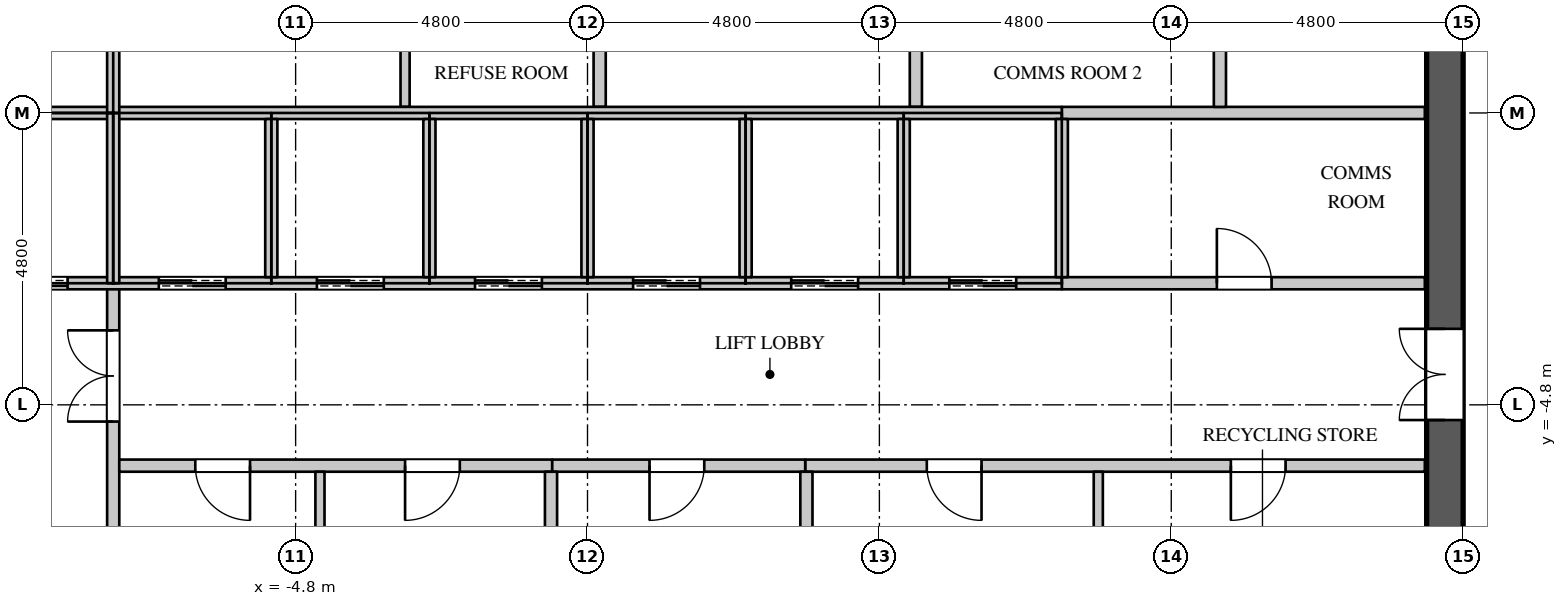
"""IFC4 building model, lengths in metres.
Left out: names, types, materials, properties, quantities, classifications, styles, units other than length and angle.
Written with IfcOpenShell. Run it as: python <this file> out.ifc"""

import sys

from ifc_helpers import new_model, si_unit, direction, frame, frame_2d, origin, place, context, subcontext, project, spatial, rectangle, extrude, element, fill, save


model = new_model("IFC4")
c1 = context("Model", 3, precision=1e-05, world=origin(), true_north=direction((0.0, 1.0)))
c2 = subcontext(c1, "Body", "Model", "MODEL_VIEW")
j1 = project(units=[si_unit("LENGTHUNIT", "METRE"), si_unit("PLANEANGLEUNIT", "RADIAN")], contexts=[c1])
p1 = place(None, origin())
s1 = spatial("IfcSite", under=j1, at=p1, CompositionType="ELEMENT")
p2 = place(p1, origin())
s2 = spatial("IfcBuilding", under=s1, at=p2, CompositionType="ELEMENT")
p3 = place(p2, frame((0.0, 0.0, 260.1)))
s3 = spatial("IfcBuildingStorey", under=s2, at=p3, CompositionType="ELEMENT", Elevation=260.1)
p4 = place(p3, frame((14.1, -11.4, 0.0), z_axis=(0.0, 0.0, 1.0), x_axis=(0.0, 1.0, 0.0)))
e1 = element("IfcWall", 1, at=p4, inside=s3, PredefinedType="SHEAR", context=c2, shape_type="SweptSolid", body=[
    extrude(rectangle(XDim=22.8, YDim=0.6, at=frame_2d((11.4, 0.0))), origin(), (0.0, 0.0, 1.0), 4.2),
])
p5 = place(p4, frame((20.45, 0.0, 0.0)))
e2 = element("IfcOpeningElement", 2, at=p5, cuts=e1, PredefinedType="OPENING", context=c2, shape_type="SweptSolid", body=[
    extrude(rectangle(XDim=1.1, YDim=2.2, at=frame_2d((0.55, 1.1))), frame((0.0, 0.31, 0.0), z_axis=(0.0, -1.0, 0.0), x_axis=(1.0, 0.0, 0.0)), (0.0, 0.0, 1.0), 0.62),
])
p6 = place(p4, frame((1.25, 0.0, 0.0)))
e3 = element("IfcOpeningElement", 3, at=p6, cuts=e1, PredefinedType="OPENING", context=c2, shape_type="SweptSolid", body=[
    extrude(rectangle(XDim=1.1, YDim=2.2, at=frame_2d((0.55, 1.1))), frame((0.0, 0.31, 0.0), z_axis=(0.0, -1.0, 0.0), x_axis=(1.0, 0.0, 0.0)), (0.0, 0.0, 1.0), 0.62),
])
p7 = place(p4, frame((14.95, 0.0, 0.0)))
e4 = element("IfcOpeningElement", 4, at=p7, cuts=e1, PredefinedType="OPENING", context=c2, shape_type="SweptSolid", body=[
    extrude(rectangle(XDim=1.5, YDim=2.4, at=frame_2d((0.75, 1.2))), frame((0.0, 0.31, 0.0), z_axis=(0.0, -1.0, 0.0), x_axis=(1.0, 0.0, 0.0)), (0.0, 0.0, 1.0), 0.62),
])
p8 = place(p4, frame((6.35, 0.0, 0.0)))
e5 = element("IfcOpeningElement", 5, at=p8, cuts=e1, PredefinedType="OPENING", context=c2, shape_type="SweptSolid", body=[
    extrude(rectangle(XDim=1.5, YDim=2.4, at=frame_2d((0.75, 1.2))), frame((0.0, 0.31, 0.0), z_axis=(0.0, -1.0, 0.0), x_axis=(1.0, 0.0, 0.0)), (0.0, 0.0, 1.0), 0.62),
])
p9 = place(p3, frame((-7.8, -8.075, 0.0), z_axis=(0.0, 0.0, 1.0), x_axis=(0.0, 1.0, 0.0)))
e6 = element("IfcWall", 6, at=p9, inside=s3, PredefinedType="PARTITIONING", context=c2, shape_type="SweptSolid", body=[
    extrude(rectangle(XDim=5.275, YDim=0.2, at=frame_2d((2.637, 0.0))), origin(), (0.0, 0.0, 1.0), 3.95),
])
p10 = place(p9, frame((3.0, 0.0, 0.0)))
e7 = element("IfcOpeningElement", 7, at=p10, cuts=e6, PredefinedType="OPENING", context=c2, shape_type="SweptSolid", body=[
    extrude(rectangle(XDim=1.5, YDim=2.4, at=frame_2d((0.75, 1.2))), frame((0.0, 0.11, 0.0), z_axis=(0.0, -1.0, 0.0), x_axis=(1.0, 0.0, 0.0)), (0.0, 0.0, 1.0), 0.22),
])
p11 = place(p3, frame((-7.7, -5.8, 0.0), z_axis=(0.0, 0.0, 1.0), x_axis=(1.0, 0.0, 0.0)))
e8 = element("IfcWall", 8, at=p11, inside=s3, PredefinedType="PARTITIONING", context=c2, shape_type="SweptSolid", body=[
    extrude(rectangle(XDim=7.12, YDim=0.2, at=frame_2d((3.56, 0.0))), origin(), (0.0, 0.0, 1.0), 3.95),
])
p12 = place(p11, frame((1.25, 0.0, 0.0)))
e9 = element("IfcOpeningElement", 9, at=p12, cuts=e8, PredefinedType="OPENING", context=c2, shape_type="SweptSolid", body=[
    extrude(rectangle(XDim=0.9, YDim=2.2, at=frame_2d((0.45, 1.1))), frame((0.0, 0.11, 0.0), z_axis=(0.0, -1.0, 0.0), x_axis=(1.0, 0.0, 0.0)), (0.0, 0.0, 1.0), 0.22),
])
p13 = place(p11, frame((4.7, 0.0, 0.0)))
e10 = element("IfcOpeningElement", 10, at=p13, cuts=e8, PredefinedType="OPENING", context=c2, shape_type="SweptSolid", body=[
    extrude(rectangle(XDim=0.9, YDim=2.2, at=frame_2d((0.45, 1.1))), frame((0.0, 0.11, 0.0), z_axis=(0.0, -1.0, 0.0), x_axis=(1.0, 0.0, 0.0)), (0.0, 0.0, 1.0), 0.22),
])
p14 = place(p3, frame((3.58, -5.8, 0.0), z_axis=(0.0, 0.0, 1.0), x_axis=(1.0, 0.0, 0.0)))
e11 = element("IfcWall", 11, at=p14, inside=s3, PredefinedType="PARTITIONING", context=c2, shape_type="SweptSolid", body=[
    extrude(rectangle(XDim=10.19, YDim=0.2, at=frame_2d((5.095, 0.0))), origin(), (0.0, 0.0, 1.0), 3.95),
])
p15 = place(p14, frame((2.0, 0.0, 0.0)))
e12 = element("IfcOpeningElement", 12, at=p15, cuts=e11, PredefinedType="OPENING", context=c2, shape_type="SweptSolid", body=[
    extrude(rectangle(XDim=0.9, YDim=2.2, at=frame_2d((0.45, 1.1))), frame((0.0, 0.11, 0.0), z_axis=(0.0, -1.0, 0.0), x_axis=(1.0, 0.0, 0.0)), (0.0, 0.0, 1.0), 0.22),
])
p16 = place(p14, frame((7.0, 0.0, 0.0)))
e13 = element("IfcOpeningElement", 13, at=p16, cuts=e11, PredefinedType="OPENING", context=c2, shape_type="SweptSolid", body=[
    extrude(rectangle(XDim=0.9, YDim=2.2, at=frame_2d((0.45, 1.1))), frame((0.0, 0.11, 0.0), z_axis=(0.0, -1.0, 0.0), x_axis=(1.0, 0.0, 0.0)), (0.0, 0.0, 1.0), 0.22),
])
p17 = place(p3, frame((-4.4, -11.37, 0.0), z_axis=(0.0, 0.0, 1.0), x_axis=(0.0, 1.0, 0.0)))
e14 = element("IfcWall", 14, at=p17, inside=s3, PredefinedType="PARTITIONING", context=c2, shape_type="SweptSolid", body=[
    extrude(rectangle(XDim=5.47, YDim=0.15, at=frame_2d((2.735, 0.0))), origin(), (0.0, 0.0, 1.0), 3.95),
])
p18 = place(p3, frame((-3.0, 0.1, 0.0), z_axis=(0.0, 0.0, 1.0), x_axis=(0.0, 1.0, 0.0)))
e15 = element("IfcWall", 15, at=p18, inside=s3, PredefinedType="PARTITIONING", context=c2, shape_type="SweptSolid", body=[
    extrude(rectangle(XDim=2.6, YDim=0.15, at=frame_2d((1.3, 0.0))), origin(), (0.0, 0.0, 1.0), 3.95),
])
p19 = place(p3, frame((8.4, -8.075, 0.0), z_axis=(0.0, 0.0, 1.0), x_axis=(0.0, 1.0, 0.0)))
e16 = element("IfcWall", 16, at=p19, inside=s3, PredefinedType="PARTITIONING", context=c2, shape_type="SweptSolid", body=[
    extrude(rectangle(XDim=2.175, YDim=0.15, at=frame_2d((1.087, 0.0))), origin(), (0.0, 0.0, 1.0), 3.95),
])
p20 = place(p3, frame((-0.58, -5.8, 0.0), z_axis=(0.0, 0.0, 1.0), x_axis=(1.0, 0.0, 0.0)))
e17 = element("IfcWall", 17, at=p20, inside=s3, PredefinedType="PARTITIONING", context=c2, shape_type="SweptSolid", body=[
    extrude(rectangle(XDim=4.16, YDim=0.2, at=frame_2d((2.08, 0.0))), origin(), (0.0, 0.0, 1.0), 3.95),
])
p21 = place(p20, frame((1.6, 0.0, 0.0)))
e18 = element("IfcOpeningElement", 18, at=p21, cuts=e17, PredefinedType="OPENING", context=c2, shape_type="SweptSolid", body=[
    extrude(rectangle(XDim=0.9, YDim=2.2, at=frame_2d((0.45, 1.1))), frame((0.0, 0.11, 0.0), z_axis=(0.0, -1.0, 0.0), x_axis=(1.0, 0.0, 0.0)), (0.0, 0.0, 1.0), 0.22),
])
p22 = place(p3, frame((-0.6, -11.37, 0.0), z_axis=(0.0, 0.0, 1.0), x_axis=(0.0, 1.0, 0.0)))
e19 = element("IfcWall", 19, at=p22, inside=s3, PredefinedType="PARTITIONING", context=c2, shape_type="SweptSolid", body=[
    extrude(rectangle(XDim=5.47, YDim=0.2, at=frame_2d((2.735, 0.0))), origin(), (0.0, 0.0, 1.0), 3.95),
])
p23 = place(p3, frame((0.2, 0.1, 0.0), z_axis=(0.0, 0.0, 1.0), x_axis=(0.0, 1.0, 0.0)))
e20 = element("IfcWall", 20, at=p23, inside=s3, PredefinedType="PARTITIONING", context=c2, shape_type="SweptSolid", body=[
    extrude(rectangle(XDim=2.6, YDim=0.2, at=frame_2d((1.3, 0.0))), origin(), (0.0, 0.0, 1.0), 3.95),
])
p24 = place(p3, frame((3.6, -11.37, 0.0), z_axis=(0.0, 0.0, 1.0), x_axis=(0.0, 1.0, 0.0)))
e21 = element("IfcWall", 21, at=p24, inside=s3, PredefinedType="PARTITIONING", context=c2, shape_type="SweptSolid", body=[
    extrude(rectangle(XDim=5.47, YDim=0.2, at=frame_2d((2.735, 0.0))), origin(), (0.0, 0.0, 1.0), 3.95),
])
p25 = place(p3, frame((5.4, 0.1, 0.0), z_axis=(0.0, 0.0, 1.0), x_axis=(0.0, 1.0, 0.0)))
e22 = element("IfcWall", 22, at=p25, inside=s3, PredefinedType="PARTITIONING", context=c2, shape_type="SweptSolid", body=[
    extrude(rectangle(XDim=2.6, YDim=0.2, at=frame_2d((1.3, 0.0))), origin(), (0.0, 0.0, 1.0), 3.95),
])
p26 = place(p3, frame((7.8, -2.8, 0.0), z_axis=(0.0, 0.0, 1.0), x_axis=(1.0, 0.0, 0.0)))
e23 = element("IfcWall", 23, at=p26, inside=s3, PredefinedType="PARTITIONING", context=c2, shape_type="SweptSolid", body=[
    extrude(rectangle(XDim=5.97, YDim=0.2, at=frame_2d((2.985, 0.0))), origin(), (0.0, 0.0, 1.0), 3.95),
])
p27 = place(p26, frame((2.55, 0.0, 0.0)))
e24 = element("IfcOpeningElement", 24, at=p27, cuts=e23, PredefinedType="OPENING", context=c2, shape_type="SweptSolid", body=[
    extrude(rectangle(XDim=0.9, YDim=2.2, at=frame_2d((0.45, 1.1))), frame((0.0, 0.11, 0.0), z_axis=(0.0, -1.0, 0.0), x_axis=(1.0, 0.0, 0.0)), (0.0, 0.0, 1.0), 0.22),
])
p28 = place(p3, frame((7.8, 0.0, 0.0), z_axis=(0.0, 0.0, 1.0), x_axis=(1.0, 0.0, 0.0)))
e25 = element("IfcWall", 25, at=p28, inside=s3, PredefinedType="PARTITIONING", context=c2, shape_type="SweptSolid", body=[
    extrude(rectangle(XDim=5.97, YDim=0.2, at=frame_2d((2.985, 0.0))), origin(), (0.0, 0.0, 1.0), 3.95),
])
p29 = place(p3, frame((10.4, 0.1, 0.0), z_axis=(0.0, 0.0, 1.0), x_axis=(0.0, 1.0, 0.0)))
e26 = element("IfcWall", 26, at=p29, inside=s3, PredefinedType="PARTITIONING", context=c2, shape_type="SweptSolid", body=[
    extrude(rectangle(XDim=2.6, YDim=0.2, at=frame_2d((1.3, 0.0))), origin(), (0.0, 0.0, 1.0), 3.95),
])
p30 = place(p3, frame((-13.77, 0.0, 0.0), z_axis=(0.0, 0.0, 1.0), x_axis=(1.0, 0.0, 0.0)))
e27 = element("IfcWall", 27, at=p30, inside=s3, PredefinedType="PARTITIONING", context=c2, shape_type="SweptSolid", body=[
    extrude(rectangle(XDim=21.57, YDim=0.2, at=frame_2d((10.785, 0.0))), origin(), (0.0, 0.0, 1.0), 3.95),
])
p31 = place(p3, frame((-10.4, -2.8, 0.0), z_axis=(0.0, 0.0, 1.0), x_axis=(1.0, 0.0, 0.0)))
e28 = element("IfcWall", 28, at=p31, inside=s3, PredefinedType="PARTITIONING", context=c2, shape_type="SweptSolid", body=[
    extrude(rectangle(XDim=18.2, YDim=0.2, at=frame_2d((9.1, 0.0))), origin(), (0.0, 0.0, 1.0), 3.95),
])
p32 = place(p31, frame((0.75, 0.0, 0.0)))
e29 = element("IfcOpeningElement", 29, at=p32, cuts=e28, PredefinedType="OPENING", context=c2, shape_type="SweptSolid", body=[
    extrude(rectangle(XDim=1.1, YDim=2.2, at=frame_2d((0.55, 1.1))), frame((0.0, 0.11, 0.0), z_axis=(0.0, -1.0, 0.0), x_axis=(1.0, 0.0, 0.0)), (0.0, 0.0, 1.0), 0.22),
])
p33 = place(p31, frame((3.35, 0.0, 0.0)))
e30 = element("IfcOpeningElement", 30, at=p33, cuts=e28, PredefinedType="OPENING", context=c2, shape_type="SweptSolid", body=[
    extrude(rectangle(XDim=1.1, YDim=2.2, at=frame_2d((0.55, 1.1))), frame((0.0, 0.11, 0.0), z_axis=(0.0, -1.0, 0.0), x_axis=(1.0, 0.0, 0.0)), (0.0, 0.0, 1.0), 0.22),
])
p34 = place(p31, frame((5.95, 0.0, 0.0)))
e31 = element("IfcOpeningElement", 31, at=p34, cuts=e28, PredefinedType="OPENING", context=c2, shape_type="SweptSolid", body=[
    extrude(rectangle(XDim=1.1, YDim=2.2, at=frame_2d((0.55, 1.1))), frame((0.0, 0.11, 0.0), z_axis=(0.0, -1.0, 0.0), x_axis=(1.0, 0.0, 0.0)), (0.0, 0.0, 1.0), 0.22),
])
p35 = place(p31, frame((8.55, 0.0, 0.0)))
e32 = element("IfcOpeningElement", 32, at=p35, cuts=e28, PredefinedType="OPENING", context=c2, shape_type="SweptSolid", body=[
    extrude(rectangle(XDim=1.1, YDim=2.2, at=frame_2d((0.55, 1.1))), frame((0.0, 0.11, 0.0), z_axis=(0.0, -1.0, 0.0), x_axis=(1.0, 0.0, 0.0)), (0.0, 0.0, 1.0), 0.22),
])
p36 = place(p31, frame((11.15, 0.0, 0.0)))
e33 = element("IfcOpeningElement", 33, at=p36, cuts=e28, PredefinedType="OPENING", context=c2, shape_type="SweptSolid", body=[
    extrude(rectangle(XDim=1.1, YDim=2.2, at=frame_2d((0.55, 1.1))), frame((0.0, 0.11, 0.0), z_axis=(0.0, -1.0, 0.0), x_axis=(1.0, 0.0, 0.0)), (0.0, 0.0, 1.0), 0.22),
])
p37 = place(p31, frame((13.75, 0.0, 0.0)))
e34 = element("IfcOpeningElement", 34, at=p37, cuts=e28, PredefinedType="OPENING", context=c2, shape_type="SweptSolid", body=[
    extrude(rectangle(XDim=1.1, YDim=2.2, at=frame_2d((0.55, 1.1))), frame((0.0, 0.11, 0.0), z_axis=(0.0, -1.0, 0.0), x_axis=(1.0, 0.0, 0.0)), (0.0, 0.0, 1.0), 0.22),
])
p38 = place(p31, frame((16.35, 0.0, 0.0)))
e35 = element("IfcOpeningElement", 35, at=p38, cuts=e28, PredefinedType="OPENING", context=c2, shape_type="SweptSolid", body=[
    extrude(rectangle(XDim=1.1, YDim=2.2, at=frame_2d((0.55, 1.1))), frame((0.0, 0.11, 0.0), z_axis=(0.0, -1.0, 0.0), x_axis=(1.0, 0.0, 0.0)), (0.0, 0.0, 1.0), 0.22),
])
for number, where, z_axis, x_axis in (
    (36, (-7.8, -2.8, 0.0), (0.0, 0.0, 1.0), (0.0, 1.0, 0.0)),
    (37, (-7.8, 0.0, 0.0), (0.0, 0.0, 1.0), (0.0, 1.0, 0.0)),
):
    element("IfcWall", number, at=place(p3, frame(where, z_axis=z_axis, x_axis=x_axis)), inside=s3, PredefinedType="PARTITIONING", context=c2, shape_type="SweptSolid", body=[
        extrude(rectangle(XDim=2.8, YDim=0.2, at=frame_2d((1.4, 0.0))), origin(), (0.0, 0.0, 1.0), 3.95),
    ])
for number, where, z_axis, x_axis in (
    (38, (-5.2, -2.7, 0.0), (0.0, 0.0, 1.0), (0.0, 1.0, 0.0)),
    (39, (-2.6, -2.7, 0.0), (0.0, 0.0, 1.0), (0.0, 1.0, 0.0)),
    (40, (0.0, -2.7, 0.0), (0.0, 0.0, 1.0), (0.0, 1.0, 0.0)),
    (41, (2.6, -2.7, 0.0), (0.0, 0.0, 1.0), (0.0, 1.0, 0.0)),
    (42, (5.2, -2.7, 0.0), (0.0, 0.0, 1.0), (0.0, 1.0, 0.0)),
    (43, (7.8, -2.7, 0.0), (0.0, 0.0, 1.0), (0.0, 1.0, 0.0)),
):
    element("IfcWall", number, at=place(p3, frame(where, z_axis=z_axis, x_axis=x_axis)), inside=s3, PredefinedType="PARTITIONING", context=c2, shape_type="SweptSolid", body=[
        extrude(rectangle(XDim=2.6, YDim=0.2, at=frame_2d((1.3, 0.0))), origin(), (0.0, 0.0, 1.0), 3.95),
    ])
p39 = place(p27, origin())
e44 = element("IfcDoor", 44, at=p39, inside=s3, OperationType="SINGLE_SWING_LEFT", PredefinedType="DOOR", context=c2, shape_type="SweptSolid", body=[
    extrude(rectangle(XDim=0.9, YDim=2.2, at=frame_2d((0.45, 1.1))), frame((0.0, 0.025, 0.0), z_axis=(0.0, -1.0, 0.0), x_axis=(1.0, 0.0, 0.0)), (0.0, 0.0, 1.0), 0.05),
])
fill(e24, e44)
p40 = place(p12, origin())
e45 = element("IfcDoor", 45, at=p40, inside=s3, OperationType="SINGLE_SWING_LEFT", PredefinedType="DOOR", context=c2, shape_type="SweptSolid", body=[
    extrude(rectangle(XDim=0.9, YDim=2.2, at=frame_2d((0.45, 1.1))), frame((0.0, 0.025, 0.0), z_axis=(0.0, -1.0, 0.0), x_axis=(1.0, 0.0, 0.0)), (0.0, 0.0, 1.0), 0.05),
])
fill(e9, e45)
p41 = place(p13, origin())
e46 = element("IfcDoor", 46, at=p41, inside=s3, OperationType="SINGLE_SWING_RIGHT", PredefinedType="DOOR", context=c2, shape_type="SweptSolid", body=[
    extrude(rectangle(XDim=0.9, YDim=2.2, at=frame_2d((0.45, 1.1))), frame((0.0, 0.025, 0.0), z_axis=(0.0, -1.0, 0.0), x_axis=(1.0, 0.0, 0.0)), (0.0, 0.0, 1.0), 0.05),
])
fill(e10, e46)
p42 = place(p21, origin())
e47 = element("IfcDoor", 47, at=p42, inside=s3, OperationType="SINGLE_SWING_RIGHT", PredefinedType="DOOR", context=c2, shape_type="SweptSolid", body=[
    extrude(rectangle(XDim=0.9, YDim=2.2, at=frame_2d((0.45, 1.1))), frame((0.0, 0.025, 0.0), z_axis=(0.0, -1.0, 0.0), x_axis=(1.0, 0.0, 0.0)), (0.0, 0.0, 1.0), 0.05),
])
fill(e18, e47)
p43 = place(p15, origin())
e48 = element("IfcDoor", 48, at=p43, inside=s3, OperationType="SINGLE_SWING_LEFT", PredefinedType="DOOR", context=c2, shape_type="SweptSolid", body=[
    extrude(rectangle(XDim=0.9, YDim=2.2, at=frame_2d((0.45, 1.1))), frame((0.0, 0.025, 0.0), z_axis=(0.0, -1.0, 0.0), x_axis=(1.0, 0.0, 0.0)), (0.0, 0.0, 1.0), 0.05),
])
fill(e12, e48)
p44 = place(p16, origin())
e49 = element("IfcDoor", 49, at=p44, inside=s3, OperationType="SINGLE_SWING_RIGHT", PredefinedType="DOOR", context=c2, shape_type="SweptSolid", body=[
    extrude(rectangle(XDim=0.9, YDim=2.2, at=frame_2d((0.45, 1.1))), frame((0.0, 0.025, 0.0), z_axis=(0.0, -1.0, 0.0), x_axis=(1.0, 0.0, 0.0)), (0.0, 0.0, 1.0), 0.05),
])
fill(e13, e49)
p45 = place(p32, origin())
e50 = element("IfcDoor", 50, at=p45, inside=s3, OperationType="DOUBLE_DOOR_SLIDING", PredefinedType="DOOR", context=c2, shape_type="SweptSolid", body=[
    extrude(rectangle(XDim=1.1, YDim=2.2, at=frame_2d((0.55, 1.1))), frame((0.0, 0.025, 0.0), z_axis=(0.0, -1.0, 0.0), x_axis=(1.0, 0.0, 0.0)), (0.0, 0.0, 1.0), 0.05),
])
fill(e29, e50)
p46 = place(p33, origin())
e51 = element("IfcDoor", 51, at=p46, inside=s3, OperationType="DOUBLE_DOOR_SLIDING", PredefinedType="DOOR", context=c2, shape_type="SweptSolid", body=[
    extrude(rectangle(XDim=1.1, YDim=2.2, at=frame_2d((0.55, 1.1))), frame((0.0, 0.025, 0.0), z_axis=(0.0, -1.0, 0.0), x_axis=(1.0, 0.0, 0.0)), (0.0, 0.0, 1.0), 0.05),
])
fill(e30, e51)
p47 = place(p34, origin())
e52 = element("IfcDoor", 52, at=p47, inside=s3, OperationType="DOUBLE_DOOR_SLIDING", PredefinedType="DOOR", context=c2, shape_type="SweptSolid", body=[
    extrude(rectangle(XDim=1.1, YDim=2.2, at=frame_2d((0.55, 1.1))), frame((0.0, 0.025, 0.0), z_axis=(0.0, -1.0, 0.0), x_axis=(1.0, 0.0, 0.0)), (0.0, 0.0, 1.0), 0.05),
])
fill(e31, e52)
p48 = place(p35, origin())
e53 = element("IfcDoor", 53, at=p48, inside=s3, OperationType="DOUBLE_DOOR_SLIDING", PredefinedType="DOOR", context=c2, shape_type="SweptSolid", body=[
    extrude(rectangle(XDim=1.1, YDim=2.2, at=frame_2d((0.55, 1.1))), frame((0.0, 0.025, 0.0), z_axis=(0.0, -1.0, 0.0), x_axis=(1.0, 0.0, 0.0)), (0.0, 0.0, 1.0), 0.05),
])
fill(e32, e53)
p49 = place(p36, origin())
e54 = element("IfcDoor", 54, at=p49, inside=s3, OperationType="DOUBLE_DOOR_SLIDING", PredefinedType="DOOR", context=c2, shape_type="SweptSolid", body=[
    extrude(rectangle(XDim=1.1, YDim=2.2, at=frame_2d((0.55, 1.1))), frame((0.0, 0.025, 0.0), z_axis=(0.0, -1.0, 0.0), x_axis=(1.0, 0.0, 0.0)), (0.0, 0.0, 1.0), 0.05),
])
fill(e33, e54)
p50 = place(p37, origin())
e55 = element("IfcDoor", 55, at=p50, inside=s3, OperationType="DOUBLE_DOOR_SLIDING", PredefinedType="DOOR", context=c2, shape_type="SweptSolid", body=[
    extrude(rectangle(XDim=1.1, YDim=2.2, at=frame_2d((0.55, 1.1))), frame((0.0, 0.025, 0.0), z_axis=(0.0, -1.0, 0.0), x_axis=(1.0, 0.0, 0.0)), (0.0, 0.0, 1.0), 0.05),
])
fill(e34, e55)
p51 = place(p38, origin())
e56 = element("IfcDoor", 56, at=p51, inside=s3, OperationType="DOUBLE_DOOR_SLIDING", PredefinedType="DOOR", context=c2, shape_type="SweptSolid", body=[
    extrude(rectangle(XDim=1.1, YDim=2.2, at=frame_2d((0.55, 1.1))), frame((0.0, 0.025, 0.0), z_axis=(0.0, -1.0, 0.0), x_axis=(1.0, 0.0, 0.0)), (0.0, 0.0, 1.0), 0.05),
])
fill(e35, e56)
p52 = place(p10, origin())
e57 = element("IfcDoor", 57, at=p52, inside=s3, OperationType="DOUBLE_DOOR_SINGLE_SWING", PredefinedType="DOOR", context=c2, shape_type="SweptSolid", body=[
    extrude(rectangle(XDim=1.5, YDim=2.4, at=frame_2d((0.75, 1.2))), frame((0.0, 0.025, 0.0), z_axis=(0.0, -1.0, 0.0), x_axis=(1.0, 0.0, 0.0)), (0.0, 0.0, 1.0), 0.05),
])
fill(e7, e57)
p53 = place(p8, origin())
e58 = element("IfcDoor", 58, at=p53, inside=s3, OperationType="DOUBLE_DOOR_SINGLE_SWING", PredefinedType="DOOR", context=c2, shape_type="SweptSolid", body=[
    extrude(rectangle(XDim=1.5, YDim=2.4, at=frame_2d((0.75, 1.2))), frame((0.0, 0.295, 0.0), z_axis=(0.0, -1.0, 0.0), x_axis=(1.0, 0.0, 0.0)), (0.0, 0.0, 1.0), 0.05),
])
fill(e5, e58)
save(model, sys.argv[1])
